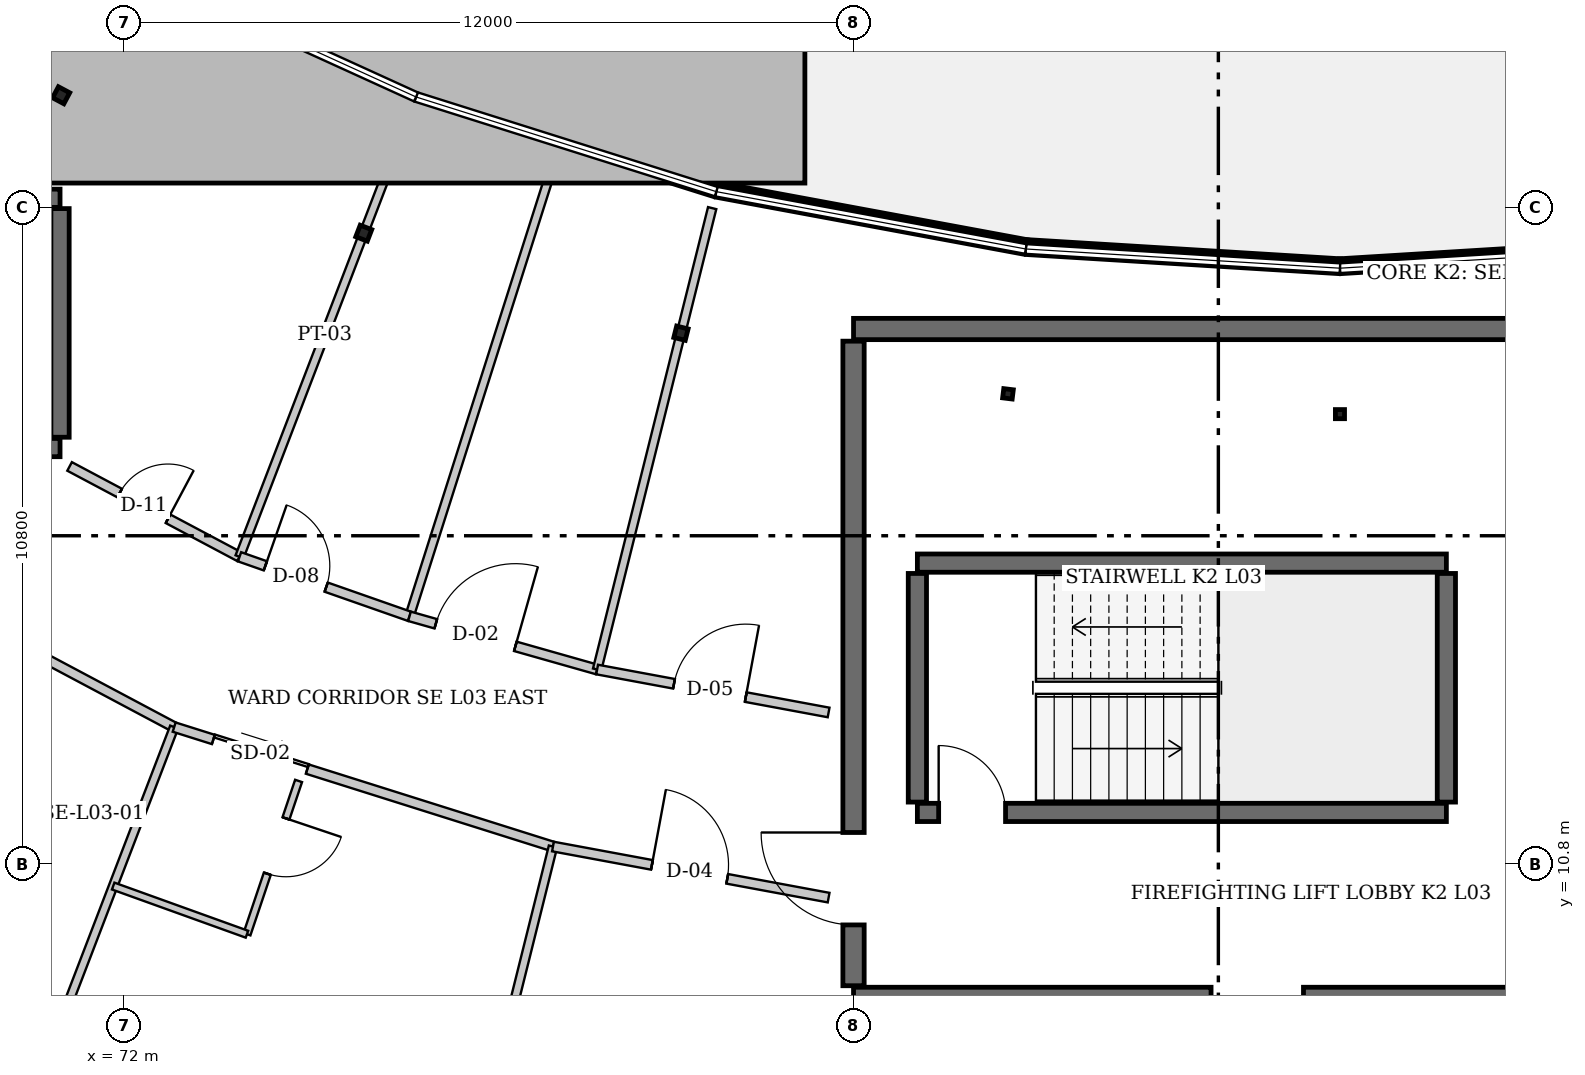
"""IFC4 building model, lengths in metres.
Left out: names, types, materials, properties, quantities, classifications, styles, units other than length and angle.
Written with IfcOpenShell. Run it as: python <this file> out.ifc"""

import sys

from ifc_helpers import new_model, si_unit, direction, frame, frame_2d, origin, origin_2d, place, context, subcontext, project, spatial, rectangle, hollow_rectangle, hollow_circle, i_section, extrude, element, fill, save


model = new_model("IFC4")
c1 = context("Model", 3, precision=1e-05, world=origin(), true_north=direction((0.0, 1.0)))
c2 = subcontext(c1, "Body", "Model", "MODEL_VIEW")
j1 = project(units=[si_unit("LENGTHUNIT", "METRE"), si_unit("PLANEANGLEUNIT", "RADIAN")], contexts=[c1])
p1 = place(None, origin())
s1 = spatial("IfcSite", under=j1, at=p1, CompositionType="ELEMENT")
p2 = place(p1, origin())
s2 = spatial("IfcBuilding", under=s1, at=p2, CompositionType="ELEMENT")
p3 = place(p2, frame((0.0, 0.0, 14.4)))
s3 = spatial("IfcBuildingStorey", under=s2, at=p3, CompositionType="ELEMENT", Elevation=14.4)
p4 = place(p3, frame((70.968, 23.444, 0.0), z_axis=(0.0, 0.0, 1.0), x_axis=(0.469471562786, 0.882947592859, 0.0)))
e1 = element("IfcColumn", 1, at=p4, inside=s3, PredefinedType="COLUMN", context=c2, shape_type="SweptSolid", body=[
    extrude(i_section(OverallWidth=0.205, OverallDepth=0.21, WebThickness=0.009, FlangeThickness=0.014, at=origin_2d()), origin(), (0.0, 0.0, 1.0), 3.9),
])
p5 = place(p3, frame((75.945, 21.176, 0.0), z_axis=(0.0, 0.0, 1.0), x_axis=(0.358367949545, 0.933580426497, 0.0)))
e2 = element("IfcColumn", 2, at=p5, inside=s3, PredefinedType="COLUMN", context=c2, shape_type="SweptSolid", body=[
    extrude(i_section(OverallWidth=0.203, OverallDepth=0.203, WebThickness=0.007, FlangeThickness=0.011, at=origin_2d()), origin(), (0.0, 0.0, 1.0), 3.9),
])
p6 = place(p3, frame((81.162, 19.531, 0.0), z_axis=(0.0, 0.0, 1.0), x_axis=(0.2419218956, 0.970295726276, 0.0)))
e3 = element("IfcColumn", 3, at=p6, inside=s3, PredefinedType="COLUMN", context=c2, shape_type="SweptSolid", body=[
    extrude(hollow_circle(Radius=0.097, WallThickness=0.008, at=origin_2d()), origin(), (0.0, 0.0, 1.0), 3.9),
])
p7 = place(p3, frame((86.54, 18.534, 0.0), z_axis=(0.0, 0.0, 1.0), x_axis=(0.121869343405, 0.992546151641, 0.0)))
e4 = element("IfcColumn", 4, at=p7, inside=s3, PredefinedType="COLUMN", context=c2, shape_type="SweptSolid", body=[
    extrude(i_section(OverallWidth=0.153, OverallDepth=0.158, WebThickness=0.007, FlangeThickness=0.01, at=origin_2d()), origin(), (0.0, 0.0, 1.0), 3.9),
])
p8 = place(p3, frame((92.0, 18.2, 0.0), z_axis=(0.0, 0.0, 1.0), x_axis=(0.0, 1.0, 0.0)))
e5 = element("IfcColumn", 5, at=p8, inside=s3, PredefinedType="COLUMN", context=c2, shape_type="SweptSolid", body=[
    extrude(hollow_rectangle(XDim=0.15, YDim=0.15, WallThickness=0.008, at=origin_2d()), origin(), (0.0, 0.0, 1.0), 3.9),
])
p9 = place(p3, frame((84.0, 19.6, 0.0), z_axis=(0.0, 0.0, 1.0), x_axis=(1.0, 0.0, 0.0)))
e6 = element("IfcWall", 6, at=p9, inside=s3, PredefinedType="SHEAR", context=c2, shape_type="SweptSolid", body=[
    extrude(rectangle(XDim=20.4, YDim=0.35, at=frame_2d((10.2, 0.0))), origin(), (0.0, 0.0, 1.0), 3.9),
])
p10 = place(p3, frame((104.4, 8.6, 0.0), z_axis=(0.0, 0.0, 1.0), x_axis=(-1.0, 0.0, 0.0)))
e7 = element("IfcWall", 7, at=p10, inside=s3, PredefinedType="SHEAR", context=c2, shape_type="SweptSolid", body=[
    extrude(rectangle(XDim=20.4, YDim=0.35, at=frame_2d((10.2, 0.0))), origin(), (0.0, 0.0, 1.0), 3.9),
])
p11 = place(p10, frame((2.2, 0.0, 0.0)))
e8 = element("IfcOpeningElement", 8, at=p11, cuts=e7, PredefinedType="OPENING", context=c2, shape_type="SweptSolid", body=[
    extrude(rectangle(XDim=1.64, YDim=2.2, at=frame_2d((0.82, 1.1))), frame((0.0, 0.185, 0.0), z_axis=(0.0, -1.0, 0.0), x_axis=(1.0, 0.0, 0.0)), (0.0, 0.0, 1.0), 0.37),
])
p12 = place(p10, frame((13.0, 0.0, 0.0)))
e9 = element("IfcOpeningElement", 9, at=p12, cuts=e7, PredefinedType="OPENING", context=c2, shape_type="SweptSolid", body=[
    extrude(rectangle(XDim=1.52, YDim=2.16, at=frame_2d((0.76, 1.08))), frame((0.0, 0.185, 0.0), z_axis=(0.0, -1.0, 0.0), x_axis=(1.0, 0.0, 0.0)), (0.0, 0.0, 1.0), 0.37),
])
p13 = place(p3, frame((84.0, 8.8, 0.0), z_axis=(0.0, 0.0, 1.0), x_axis=(0.0, 1.0, 0.0)))
e10 = element("IfcWall", 10, at=p13, inside=s3, PredefinedType="SHEAR", context=c2, shape_type="SweptSolid", body=[
    extrude(rectangle(XDim=10.6, YDim=0.35, at=frame_2d((5.3, 0.0))), origin(), (0.0, 0.0, 1.0), 3.9),
])
p14 = place(p13, frame((1.0, 0.0, 0.0)))
e11 = element("IfcOpeningElement", 11, at=p14, cuts=e10, PredefinedType="OPENING", context=c2, shape_type="SweptSolid", body=[
    extrude(rectangle(XDim=1.52, YDim=2.16, at=frame_2d((0.76, 1.08))), frame((0.0, 0.185, 0.0), z_axis=(0.0, -1.0, 0.0), x_axis=(1.0, 0.0, 0.0)), (0.0, 0.0, 1.0), 0.37),
])
p15 = place(p3, frame((85.05, 11.65, 0.0), z_axis=(0.0, 0.0, 1.0), x_axis=(1.0, 0.0, 0.0)))
e12 = element("IfcWall", 12, at=p15, inside=s3, PredefinedType="SHEAR", context=c2, shape_type="SweptSolid", body=[
    extrude(rectangle(XDim=8.7, YDim=0.3, at=frame_2d((4.35, 0.0))), origin(), (0.0, 0.0, 1.0), 3.9),
])
p16 = place(p15, frame((0.35, 0.0, 0.0)))
e13 = element("IfcOpeningElement", 13, at=p16, cuts=e12, PredefinedType="OPENING", context=c2, shape_type="SweptSolid", body=[
    extrude(rectangle(XDim=1.1, YDim=2.15, at=frame_2d((0.55, 1.075))), frame((0.0, 0.16, 0.0), z_axis=(0.0, -1.0, 0.0), x_axis=(1.0, 0.0, 0.0)), (0.0, 0.0, 1.0), 0.32),
])
p17 = place(p3, frame((93.75, 15.75, 0.0), z_axis=(0.0, 0.0, 1.0), x_axis=(-1.0, 0.0, 0.0)))
e14 = element("IfcWall", 14, at=p17, inside=s3, PredefinedType="SHEAR", context=c2, shape_type="SweptSolid", body=[
    extrude(rectangle(XDim=8.7, YDim=0.3, at=frame_2d((4.35, 0.0))), origin(), (0.0, 0.0, 1.0), 3.9),
])
for number, where, z_axis, x_axis in (
    (15, (85.05, 11.82, 0.0), (0.0, 0.0, 1.0), (0.0, 1.0, 0.0)),
    (16, (93.75, 11.82, 0.0), (0.0, 0.0, 1.0), (0.0, 1.0, 0.0)),
):
    element("IfcWall", number, at=place(p3, frame(where, z_axis=z_axis, x_axis=x_axis)), inside=s3, PredefinedType="SHEAR", context=c2, shape_type="SweptSolid", body=[
        extrude(rectangle(XDim=3.76, YDim=0.3, at=frame_2d((1.88, 0.0))), origin(), (0.0, 0.0, 1.0), 3.9),
    ])
p18 = place(p3, frame((62.25, 17.65, 0.0), z_axis=(0.0, 0.0, 1.0), x_axis=(1.0, 0.0, 0.0)))
e17 = element("IfcWall", 17, at=p18, inside=s3, PredefinedType="SHEAR", context=c2, shape_type="SweptSolid", body=[
    extrude(rectangle(XDim=8.7, YDim=0.3, at=frame_2d((4.35, 0.0))), origin(), (0.0, 0.0, 1.0), 3.9),
])
p19 = place(p18, frame((0.35, 0.0, 0.0)))
e18 = element("IfcOpeningElement", 18, at=p19, cuts=e17, PredefinedType="OPENING", context=c2, shape_type="SweptSolid", body=[
    extrude(rectangle(XDim=1.1, YDim=2.15, at=frame_2d((0.55, 1.075))), frame((0.0, 0.16, 0.0), z_axis=(0.0, -1.0, 0.0), x_axis=(1.0, 0.0, 0.0)), (0.0, 0.0, 1.0), 0.32),
])
p20 = place(p3, frame((70.95, 21.75, 0.0), z_axis=(0.0, 0.0, 1.0), x_axis=(-1.0, 0.0, 0.0)))
e19 = element("IfcWall", 19, at=p20, inside=s3, PredefinedType="SHEAR", context=c2, shape_type="SweptSolid", body=[
    extrude(rectangle(XDim=8.7, YDim=0.3, at=frame_2d((4.35, 0.0))), origin(), (0.0, 0.0, 1.0), 3.9),
])
p21 = place(p3, frame((70.95, 17.82, 0.0), z_axis=(0.0, 0.0, 1.0), x_axis=(0.0, 1.0, 0.0)))
e20 = element("IfcWall", 20, at=p21, inside=s3, PredefinedType="SHEAR", context=c2, shape_type="SweptSolid", body=[
    extrude(rectangle(XDim=3.76, YDim=0.3, at=frame_2d((1.88, 0.0))), origin(), (0.0, 0.0, 1.0), 3.9),
])
for number, where, z_axis, x_axis in (
    (21, (92.0, 20.6, 0.0), (0.0, 0.0, 1.0), (0.998, 0.061, 0.0)),
    (22, (86.833, 20.916, 0.0), (0.0, 0.0, 1.0), (0.998, -0.061, 0.0)),
    (23, (81.743, 21.859, 0.0), (0.0, 0.0, 1.0), (0.983, -0.182, 0.0)),
):
    element("IfcWall", number, at=place(p3, frame(where, z_axis=z_axis, x_axis=x_axis)), inside=s3, PredefinedType="STANDARD", context=c2, shape_type="SweptSolid", body=[
        extrude(rectangle(XDim=5.177, YDim=0.22, at=frame_2d((2.588, 0.0))), origin(), (0.0, 0.0, 1.0), 1.05),
    ])
p22 = place(p3, frame((76.805, 23.416, 0.0), z_axis=(0.0, 0.0, 1.0), x_axis=(0.953706582316, -0.300738681994, 0.0)))
e24 = element("IfcWall", 24, at=p22, inside=s3, PredefinedType="STANDARD", context=c2, shape_type="SweptSolid", body=[
    extrude(rectangle(XDim=5.178, YDim=0.22, at=frame_2d((2.589, 0.0))), origin(), (0.0, 0.0, 1.0), 1.05),
])
p23 = place(p3, frame((72.094, 25.563, 0.0), z_axis=(0.0, 0.0, 1.0), x_axis=(0.909955822384, -0.414705198074, 0.0)))
e25 = element("IfcWall", 25, at=p23, inside=s3, PredefinedType="STANDARD", context=c2, shape_type="SweptSolid", body=[
    extrude(rectangle(XDim=5.177, YDim=0.22, at=frame_2d((2.588, 0.0))), origin(), (0.0, 0.0, 1.0), 1.05),
])
p24 = place(p3, frame((64.765, 17.34, 0.0), z_axis=(0.0, 0.0, 1.0), x_axis=(0.882926631997, -0.469510982311, 0.0)))
e26 = element("IfcWall", 26, at=p24, inside=s3, PredefinedType="PARTITIONING", context=c2, shape_type="SweptSolid", body=[
    extrude(rectangle(XDim=9.131, YDim=0.16, at=frame_2d((4.565, 0.0))), origin(), (0.0, 0.0, 1.0), 2.933),
])
p25 = place(p24, frame((3.916, 0.0, 0.0)))
e27 = element("IfcOpeningElement", 27, at=p25, cuts=e26, PredefinedType="OPENING", context=c2, shape_type="SweptSolid", body=[
    extrude(rectangle(XDim=0.96, YDim=2.06, at=frame_2d((0.48, 1.03))), frame((0.0, 0.09, 0.0), z_axis=(0.0, -1.0, 0.0), x_axis=(1.0, 0.0, 0.0)), (0.0, 0.0, 1.0), 0.18),
])
p26 = place(p3, frame((72.827, 13.053, 0.0), z_axis=(0.0, 0.0, 1.0), x_axis=(-0.358342954102, -0.933590020965, 0.0)))
e28 = element("IfcWall", 28, at=p26, inside=s3, PredefinedType="PARTITIONING", context=c2, shape_type="SweptSolid", body=[
    extrude(rectangle(XDim=7.819, YDim=0.14, at=frame_2d((3.91, 0.0))), origin(), (0.0, 0.0, 1.0), 2.933),
])
p27 = place(p3, frame((71.107, 17.34, 0.0), z_axis=(0.0, 0.0, 1.0), x_axis=(0.882964896182, -0.469439018522, 0.0)))
e29 = element("IfcWall", 29, at=p27, inside=s3, PredefinedType="PARTITIONING", context=c2, shape_type="SweptSolid", body=[
    extrude(rectangle(XDim=3.166, YDim=0.16, at=frame_2d((1.583, 0.0))), origin(), (0.0, 0.0, 1.0), 2.933),
])
p28 = place(p27, frame((0.933, 0.0, 0.0)))
e30 = element("IfcOpeningElement", 30, at=p28, cuts=e29, PredefinedType="OPENING", context=c2, shape_type="SweptSolid", body=[
    extrude(rectangle(XDim=0.9, YDim=2.1, at=frame_2d((0.45, 1.05))), frame((0.0, 0.09, 0.0), z_axis=(0.0, -1.0, 0.0), x_axis=(1.0, 0.0, 0.0)), (0.0, 0.0, 1.0), 0.18),
])
p29 = place(p3, frame((73.902, 15.854, 0.0), z_axis=(0.0, 0.0, 1.0), x_axis=(0.358410014332, 0.933564278251, 0.0)))
e31 = element("IfcWall", 31, at=p29, inside=s3, PredefinedType="PARTITIONING", context=c2, shape_type="SweptSolid", body=[
    extrude(rectangle(XDim=7.821, YDim=0.14, at=frame_2d((3.91, 0.0))), origin(), (0.0, 0.0, 1.0), 2.933),
])
p30 = place(p3, frame((74.873, 12.168, 0.0), z_axis=(0.0, 0.0, 1.0), x_axis=(-0.319199781595, -0.947687448176, 0.0)))
e32 = element("IfcWall", 32, at=p30, inside=s3, PredefinedType="PARTITIONING", context=c2, shape_type="SweptSolid", body=[
    extrude(rectangle(XDim=2.66, YDim=0.12, at=frame_2d((1.33, 0.0))), origin(), (0.0, 0.0, 1.0), 3.189),
])
p31 = place(p30, frame((0.65, 0.0, 0.0)))
e33 = element("IfcOpeningElement", 33, at=p31, cuts=e32, PredefinedType="OPENING", context=c2, shape_type="SweptSolid", body=[
    extrude(rectangle(XDim=0.96, YDim=2.06, at=frame_2d((0.48, 1.03))), frame((0.0, 0.07, 0.0), z_axis=(0.0, -1.0, 0.0), x_axis=(1.0, 0.0, 0.0)), (0.0, 0.0, 1.0), 0.14),
])
p32 = place(p3, frame((71.824, 10.439, 0.0), z_axis=(0.0, 0.0, 1.0), x_axis=(0.940886080788, -0.338723165695, 0.0)))
e34 = element("IfcWall", 34, at=p32, inside=s3, PredefinedType="PARTITIONING", context=c2, shape_type="SweptSolid", body=[
    extrude(rectangle(XDim=2.338, YDim=0.12, at=frame_2d((1.169, 0.0))), origin(), (0.0, 0.0, 1.0), 2.933),
])
p33 = place(p3, frame((72.827, 13.053, 0.0), z_axis=(0.0, 0.0, 1.0), x_axis=(0.953736183483, -0.30064479426, 0.0)))
e35 = element("IfcWall", 35, at=p33, inside=s3, PredefinedType="PARTITIONING", context=c2, shape_type="SweptSolid", body=[
    extrude(rectangle(XDim=6.532, YDim=0.16, at=frame_2d((3.266, 0.0))), origin(), (0.0, 0.0, 1.0), 2.933),
])
p34 = place(p33, frame((0.676, 0.0, 0.0)))
e36 = element("IfcOpeningElement", 36, at=p34, cuts=e35, PredefinedType="OPENING", context=c2, shape_type="SweptSolid", body=[
    extrude(rectangle(XDim=1.62, YDim=2.3, at=frame_2d((0.81, 1.15))), frame((0.0, 0.09, 0.0), z_axis=(0.0, -1.0, 0.0), x_axis=(1.0, 0.0, 0.0)), (0.0, 0.0, 1.0), 0.18),
])
p35 = place(p3, frame((79.057, 11.089, 0.0), z_axis=(0.0, 0.0, 1.0), x_axis=(-0.241911207257, -0.970298391117, 0.0)))
e37 = element("IfcWall", 37, at=p35, inside=s3, PredefinedType="PARTITIONING", context=c2, shape_type="SweptSolid", body=[
    extrude(rectangle(XDim=7.82, YDim=0.14, at=frame_2d((3.91, 0.0))), origin(), (0.0, 0.0, 1.0), 2.938),
])
p36 = place(p3, frame((76.697, 14.875, 0.0), z_axis=(0.0, 0.0, 1.0), x_axis=(0.302952343331, 0.95300570705, 0.0)))
e38 = element("IfcWall", 38, at=p36, inside=s3, PredefinedType="PARTITIONING", context=c2, shape_type="SweptSolid", body=[
    extrude(rectangle(XDim=7.819, YDim=0.14, at=frame_2d((3.91, 0.0))), origin(), (0.0, 0.0, 1.0), 3.241),
])
p37 = place(p3, frame((73.902, 15.854, 0.0), z_axis=(0.0, 0.0, 1.0), x_axis=(0.943776070457, -0.330585433485, 0.0)))
e39 = element("IfcWall", 39, at=p37, inside=s3, PredefinedType="PARTITIONING", context=c2, shape_type="SweptSolid", body=[
    extrude(rectangle(XDim=2.961, YDim=0.16, at=frame_2d((1.481, 0.0))), origin(), (0.0, 0.0, 1.0), 2.933),
])
p38 = place(p37, frame((0.45, 0.0, 0.0)))
e40 = element("IfcOpeningElement", 40, at=p38, cuts=e39, PredefinedType="OPENING", context=c2, shape_type="SweptSolid", body=[
    extrude(rectangle(XDim=1.06, YDim=2.1, at=frame_2d((0.53, 1.05))), frame((0.0, 0.09, 0.0), z_axis=(0.0, -1.0, 0.0), x_axis=(1.0, 0.0, 0.0)), (0.0, 0.0, 1.0), 0.18),
])
p39 = place(p3, frame((76.697, 14.875, 0.0), z_axis=(0.0, 0.0, 1.0), x_axis=(0.962073473599, -0.272790453274, 0.0)))
e41 = element("IfcWall", 41, at=p39, inside=s3, PredefinedType="PARTITIONING", context=c2, shape_type="SweptSolid", body=[
    extrude(rectangle(XDim=3.208, YDim=0.16, at=frame_2d((1.604, 0.0))), origin(), (0.0, 0.0, 1.0), 2.938),
])
p40 = place(p39, frame((0.45, 0.0, 0.0)))
e42 = element("IfcOpeningElement", 42, at=p40, cuts=e41, PredefinedType="OPENING", context=c2, shape_type="SweptSolid", body=[
    extrude(rectangle(XDim=1.36, YDim=2.18, at=frame_2d((0.68, 1.09))), frame((0.0, 0.09, 0.0), z_axis=(0.0, -1.0, 0.0), x_axis=(1.0, 0.0, 0.0)), (0.0, 0.0, 1.0), 0.18),
])
p41 = place(p3, frame((79.783, 14.0, 0.0), z_axis=(0.0, 0.0, 1.0), x_axis=(0.241947927131, 0.970289235515, 0.0)))
e43 = element("IfcWall", 43, at=p41, inside=s3, PredefinedType="PARTITIONING", context=c2, shape_type="SweptSolid", body=[
    extrude(rectangle(XDim=7.82, YDim=0.14, at=frame_2d((3.91, 0.0))), origin(), (0.0, 0.0, 1.0), 2.938),
])
p42 = place(p3, frame((79.057, 11.089, 0.0), z_axis=(0.0, 0.0, 1.0), x_axis=(0.983258469263, -0.182216307235, 0.0)))
e44 = element("IfcWall", 44, at=p42, inside=s3, PredefinedType="PARTITIONING", context=c2, shape_type="SweptSolid", body=[
    extrude(rectangle(XDim=4.61, YDim=0.16, at=frame_2d((2.305, 0.0))), origin(), (0.0, 0.0, 1.0), 2.938),
])
p43 = place(p42, frame((1.655, 0.0, 0.0)))
e45 = element("IfcOpeningElement", 45, at=p43, cuts=e44, PredefinedType="OPENING", context=c2, shape_type="SweptSolid", body=[
    extrude(rectangle(XDim=1.26, YDim=2.14, at=frame_2d((0.63, 1.07))), frame((0.0, 0.09, 0.0), z_axis=(0.0, -1.0, 0.0), x_axis=(1.0, 0.0, 0.0)), (0.0, 0.0, 1.0), 0.18),
])
p44 = place(p3, frame((79.783, 14.0, 0.0), z_axis=(0.0, 0.0, 1.0), x_axis=(0.983234305922, -0.182346646962, 0.0)))
e46 = element("IfcWall", 46, at=p44, inside=s3, PredefinedType="PARTITIONING", context=c2, shape_type="SweptSolid", body=[
    extrude(rectangle(XDim=3.872, YDim=0.16, at=frame_2d((1.936, 0.0))), origin(), (0.0, 0.0, 1.0), 2.938),
])
p45 = place(p44, frame((1.286, 0.0, 0.0)))
e47 = element("IfcOpeningElement", 47, at=p45, cuts=e46, PredefinedType="OPENING", context=c2, shape_type="SweptSolid", body=[
    extrude(rectangle(XDim=1.2, YDim=2.12, at=frame_2d((0.6, 1.06))), frame((0.0, 0.09, 0.0), z_axis=(0.0, -1.0, 0.0), x_axis=(1.0, 0.0, 0.0)), (0.0, 0.0, 1.0), 0.18),
])
p46 = place(p16, origin())
e48 = element("IfcDoor", 48, at=p46, inside=s3, OperationType="SINGLE_SWING_LEFT", PredefinedType="DOOR", context=c2, shape_type="SweptSolid", body=[
    extrude(rectangle(XDim=1.1, YDim=2.15, at=frame_2d((0.55, 1.075))), frame((0.0, 0.025, 0.0), z_axis=(0.0, -1.0, 0.0), x_axis=(1.0, 0.0, 0.0)), (0.0, 0.0, 1.0), 0.05),
])
fill(e13, e48)
p47 = place(p14, origin())
e49 = element("IfcDoor", 49, at=p47, inside=s3, OperationType="SINGLE_SWING_RIGHT", PredefinedType="DOOR", context=c2, shape_type="SweptSolid", body=[
    extrude(rectangle(XDim=1.52, YDim=2.16, at=frame_2d((0.76, 1.08))), frame((0.0, 0.025, 0.0), z_axis=(0.0, -1.0, 0.0), x_axis=(1.0, 0.0, 0.0)), (0.0, 0.0, 1.0), 0.05),
])
fill(e11, e49)
p48 = place(p28, origin())
e50 = element("IfcDoor", 50, at=p48, inside=s3, OperationType="SINGLE_SWING_RIGHT", PredefinedType="DOOR", context=c2, shape_type="SweptSolid", body=[
    extrude(rectangle(XDim=0.9, YDim=2.1, at=frame_2d((0.45, 1.05))), frame((0.0, 0.025, 0.0), z_axis=(0.0, -1.0, 0.0), x_axis=(1.0, 0.0, 0.0)), (0.0, 0.0, 1.0), 0.05),
])
fill(e30, e50)
p49 = place(p31, origin())
e51 = element("IfcDoor", 51, at=p49, inside=s3, OperationType="SINGLE_SWING_LEFT", PredefinedType="DOOR", context=c2, shape_type="SweptSolid", body=[
    extrude(rectangle(XDim=0.96, YDim=2.06, at=frame_2d((0.48, 1.03))), frame((0.0, 0.025, 0.0), z_axis=(0.0, -1.0, 0.0), x_axis=(1.0, 0.0, 0.0)), (0.0, 0.0, 1.0), 0.05),
])
fill(e33, e51)
p50 = place(p34, origin())
e52 = element("IfcDoor", 52, at=p50, inside=s3, OperationType="SLIDING_TO_RIGHT", PredefinedType="DOOR", context=c2, shape_type="SweptSolid", body=[
    extrude(rectangle(XDim=1.62, YDim=2.3, at=frame_2d((0.81, 1.15))), frame((0.0, 0.025, 0.0), z_axis=(0.0, -1.0, 0.0), x_axis=(1.0, 0.0, 0.0)), (0.0, 0.0, 1.0), 0.05),
])
fill(e36, e52)
p51 = place(p38, origin())
e53 = element("IfcDoor", 53, at=p51, inside=s3, OperationType="SINGLE_SWING_LEFT", PredefinedType="DOOR", context=c2, shape_type="SweptSolid", body=[
    extrude(rectangle(XDim=1.06, YDim=2.1, at=frame_2d((0.53, 1.05))), frame((0.0, 0.025, 0.0), z_axis=(0.0, -1.0, 0.0), x_axis=(1.0, 0.0, 0.0)), (0.0, 0.0, 1.0), 0.05),
])
fill(e40, e53)
p52 = place(p40, origin())
e54 = element("IfcDoor", 54, at=p52, inside=s3, OperationType="SINGLE_SWING_RIGHT", PredefinedType="DOOR", context=c2, shape_type="SweptSolid", body=[
    extrude(rectangle(XDim=1.36, YDim=2.18, at=frame_2d((0.68, 1.09))), frame((0.0, 0.025, 0.0), z_axis=(0.0, -1.0, 0.0), x_axis=(1.0, 0.0, 0.0)), (0.0, 0.0, 1.0), 0.05),
])
fill(e42, e54)
p53 = place(p43, origin())
e55 = element("IfcDoor", 55, at=p53, inside=s3, OperationType="SINGLE_SWING_LEFT", PredefinedType="DOOR", context=c2, shape_type="SweptSolid", body=[
    extrude(rectangle(XDim=1.26, YDim=2.14, at=frame_2d((0.63, 1.07))), frame((0.0, 0.025, 0.0), z_axis=(0.0, -1.0, 0.0), x_axis=(1.0, 0.0, 0.0)), (0.0, 0.0, 1.0), 0.05),
])
fill(e45, e55)
p54 = place(p45, origin())
e56 = element("IfcDoor", 56, at=p54, inside=s3, OperationType="SINGLE_SWING_RIGHT", PredefinedType="DOOR", context=c2, shape_type="SweptSolid", body=[
    extrude(rectangle(XDim=1.2, YDim=2.12, at=frame_2d((0.6, 1.06))), frame((0.0, 0.025, 0.0), z_axis=(0.0, -1.0, 0.0), x_axis=(1.0, 0.0, 0.0)), (0.0, 0.0, 1.0), 0.05),
])
fill(e47, e56)
save(model, sys.argv[1])
